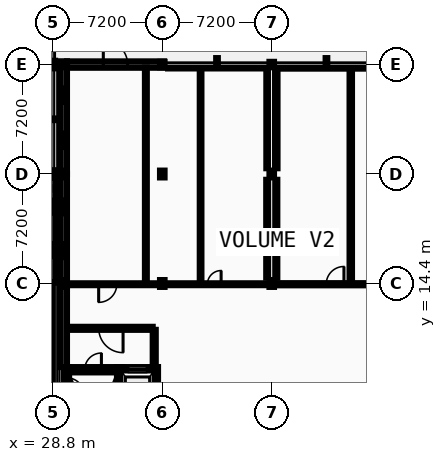
"""IFC4 building model, lengths in metres.
Left out: names, types, materials, properties, quantities, classifications, styles, units other than length and angle.
Written with IfcOpenShell. Run it as: python <this file> out.ifc"""

import sys

from ifc_helpers import new_model, si_unit, direction, frame, frame_2d, origin, origin_2d, place, context, subcontext, project, spatial, rectangle, i_section, extrude, element, fill, save


model = new_model("IFC4")
c1 = context("Model", 3, precision=1e-05, world=origin(), true_north=direction((0.0, 1.0)))
c2 = subcontext(c1, "Body", "Model", "MODEL_VIEW")
j1 = project(units=[si_unit("LENGTHUNIT", "METRE"), si_unit("PLANEANGLEUNIT", "RADIAN")], contexts=[c1])
p1 = place(None, origin())
s1 = spatial("IfcSite", under=j1, at=p1, CompositionType="ELEMENT")
p2 = place(p1, origin())
s2 = spatial("IfcBuilding", under=s1, at=p2, CompositionType="ELEMENT")
p3 = place(p2, origin())
s3 = spatial("IfcBuildingStorey", under=s2, at=p3, CompositionType="ELEMENT", Elevation=0.0)
for number, where, z_axis, x_axis in (
    (1, (28.8, 21.6, 0.0), (0.0, 0.0, 1.0), (1.0, 0.0, 0.0)),
    (2, (28.8, 28.8, 0.0), (0.0, 0.0, 1.0), (1.0, 0.0, 0.0)),
):
    element("IfcColumn", number, at=place(p3, frame(where, z_axis=z_axis, x_axis=x_axis)), inside=s3, PredefinedType="COLUMN", context=c2, shape_type="SweptSolid", body=[
        extrude(i_section(OverallWidth=0.3, OverallDepth=0.5, WebThickness=0.014, FlangeThickness=0.028, FilletRadius=0.027, at=origin_2d()), origin(), (0.0, 0.0, 1.0), 5.2),
    ])
for number, where, z_axis, x_axis in (
    (3, (29.52, 14.4, 0.0), (0.0, 0.0, 1.0), (1.0, 0.0, 0.0)),
    (4, (29.52, 21.6, 0.0), (0.0, 0.0, 1.0), (1.0, 0.0, 0.0)),
):
    element("IfcColumn", number, at=place(p3, frame(where, z_axis=z_axis, x_axis=x_axis)), inside=s3, PredefinedType="COLUMN", context=c2, shape_type="SweptSolid", body=[
        extrude(i_section(OverallWidth=0.3, OverallDepth=0.45, WebThickness=0.014, FlangeThickness=0.026, FilletRadius=0.027, at=origin_2d()), origin(), (0.0, 0.0, 1.0), 5.2),
    ])
p4 = place(p3, frame((29.52, 28.8, 0.0), z_axis=(0.0, 0.0, 1.0), x_axis=(1.0, 0.0, 0.0)))
e5 = element("IfcColumn", 5, at=p4, inside=s3, PredefinedType="COLUMN", context=c2, shape_type="SweptSolid", body=[
    extrude(i_section(OverallWidth=0.3, OverallDepth=0.36, WebThickness=0.012, FlangeThickness=0.022, FilletRadius=0.027, at=origin_2d()), origin(), (0.0, 0.0, 1.0), 5.2),
])
for number, where, z_axis, x_axis in (
    (6, (36.0, 14.4, 0.0), (0.0, 0.0, 1.0), (1.0, 0.0, 0.0)),
    (7, (36.0, 21.6, 0.0), (0.0, 0.0, 1.0), (1.0, 0.0, 0.0)),
):
    element("IfcColumn", number, at=place(p3, frame(where, z_axis=z_axis, x_axis=x_axis)), inside=s3, PredefinedType="COLUMN", context=c2, shape_type="SweptSolid", body=[
        extrude(i_section(OverallWidth=0.3, OverallDepth=0.45, WebThickness=0.014, FlangeThickness=0.026, FilletRadius=0.027, at=origin_2d()), origin(), (0.0, 0.0, 1.0), 5.2),
    ])
p5 = place(p3, frame((36.0, 28.8, 0.0), z_axis=(0.0, 0.0, 1.0), x_axis=(1.0, 0.0, 0.0)))
e8 = element("IfcColumn", 8, at=p5, inside=s3, PredefinedType="COLUMN", context=c2, shape_type="SweptSolid", body=[
    extrude(i_section(OverallWidth=0.3, OverallDepth=0.36, WebThickness=0.012, FlangeThickness=0.022, FilletRadius=0.027, at=origin_2d()), origin(), (0.0, 0.0, 1.0), 5.2),
])
for number, where, z_axis, x_axis in (
    (9, (43.2, 14.4, 0.0), (0.0, 0.0, 1.0), (1.0, 0.0, 0.0)),
    (10, (43.2, 21.6, 0.0), (0.0, 0.0, 1.0), (1.0, 0.0, 0.0)),
):
    element("IfcColumn", number, at=place(p3, frame(where, z_axis=z_axis, x_axis=x_axis)), inside=s3, PredefinedType="COLUMN", context=c2, shape_type="SweptSolid", body=[
        extrude(i_section(OverallWidth=0.3, OverallDepth=0.45, WebThickness=0.014, FlangeThickness=0.026, FilletRadius=0.027, at=origin_2d()), origin(), (0.0, 0.0, 1.0), 5.2),
    ])
p6 = place(p3, frame((43.2, 28.8, 0.0), z_axis=(0.0, 0.0, 1.0), x_axis=(1.0, 0.0, 0.0)))
e11 = element("IfcColumn", 11, at=p6, inside=s3, PredefinedType="COLUMN", context=c2, shape_type="SweptSolid", body=[
    extrude(i_section(OverallWidth=0.3, OverallDepth=0.36, WebThickness=0.012, FlangeThickness=0.022, FilletRadius=0.027, at=origin_2d()), origin(), (0.0, 0.0, 1.0), 5.2),
])
p7 = place(p3, frame((28.8, 14.45, 0.0), z_axis=(0.0, 0.0, 1.0), x_axis=(0.0, 1.0, 0.0)))
e12 = element("IfcWall", 12, at=p7, inside=s3, PredefinedType="STANDARD", context=c2, shape_type="SweptSolid", body=[
    extrude(rectangle(XDim=7.15, YDim=0.42, at=frame_2d((3.575, 0.0))), origin(), (0.0, 0.0, 1.0), 4.97),
])
p8 = place(p7, frame((1.647, 0.0, 0.95)))
e13 = element("IfcOpeningElement", 13, at=p8, cuts=e12, PredefinedType="OPENING", context=c2, shape_type="SweptSolid", body=[
    extrude(rectangle(XDim=0.996, YDim=1.26, at=frame_2d((0.498, 0.63))), frame((0.0, 0.22, 0.0), z_axis=(0.0, -1.0, 0.0), x_axis=(1.0, 0.0, 0.0)), (0.0, 0.0, 1.0), 0.44),
])
p9 = place(p7, frame((4.507, 0.0, 0.95)))
e14 = element("IfcOpeningElement", 14, at=p9, cuts=e12, PredefinedType="OPENING", context=c2, shape_type="SweptSolid", body=[
    extrude(rectangle(XDim=0.996, YDim=1.26, at=frame_2d((0.498, 0.63))), frame((0.0, 0.22, 0.0), z_axis=(0.0, -1.0, 0.0), x_axis=(1.0, 0.0, 0.0)), (0.0, 0.0, 1.0), 0.44),
])
p10 = place(p3, frame((36.11, 28.8, 0.0), z_axis=(0.0, 0.0, 1.0), x_axis=(-1.0, 0.0, 0.0)))
e15 = element("IfcWall", 15, at=p10, inside=s3, PredefinedType="STANDARD", context=c2, shape_type="SweptSolid", body=[
    extrude(rectangle(XDim=6.38, YDim=0.42, at=frame_2d((3.19, 0.0))), origin(), (0.0, 0.0, 1.0), 4.665),
])
p11 = place(p10, frame((2.39, 0.0, 0.0)))
e16 = element("IfcOpeningElement", 16, at=p11, cuts=e15, PredefinedType="OPENING", context=c2, shape_type="SweptSolid", body=[
    extrude(rectangle(XDim=1.6, YDim=2.2, at=frame_2d((0.8, 1.1))), frame((0.0, 0.22, 0.0), z_axis=(0.0, -1.0, 0.0), x_axis=(1.0, 0.0, 0.0)), (0.0, 0.0, 1.0), 0.44),
])
p12 = place(p3, frame((29.52, 14.4, 0.0), z_axis=(0.0, 0.0, 1.0), x_axis=(0.0, -1.0, 0.0)))
e17 = element("IfcWall", 17, at=p12, inside=s3, PredefinedType="STANDARD", context=c2, shape_type="SweptSolid", body=[
    extrude(rectangle(XDim=5.5, YDim=0.42, at=frame_2d((2.75, 0.0))), origin(), (0.0, 0.0, 1.0), 4.97),
])
p13 = place(p3, frame((29.52, 21.6, 0.0), z_axis=(0.0, 0.0, 1.0), x_axis=(0.0, -1.0, 0.0)))
e18 = element("IfcWall", 18, at=p13, inside=s3, PredefinedType="STANDARD", context=c2, shape_type="SweptSolid", body=[
    extrude(rectangle(XDim=7.2, YDim=0.42, at=frame_2d((3.6, 0.0))), origin(), (0.0, 0.0, 1.0), 4.665),
])
p14 = place(p13, frame((1.628, 0.0, 0.95)))
e19 = element("IfcOpeningElement", 19, at=p14, cuts=e18, PredefinedType="OPENING", context=c2, shape_type="SweptSolid", body=[
    extrude(rectangle(XDim=1.064, YDim=1.296, at=frame_2d((0.532, 0.648))), frame((0.0, 0.22, 0.0), z_axis=(0.0, -1.0, 0.0), x_axis=(1.0, 0.0, 0.0)), (0.0, 0.0, 1.0), 0.44),
])
p15 = place(p13, frame((4.508, 0.0, 0.95)))
e20 = element("IfcOpeningElement", 20, at=p15, cuts=e18, PredefinedType="OPENING", context=c2, shape_type="SweptSolid", body=[
    extrude(rectangle(XDim=1.064, YDim=1.296, at=frame_2d((0.532, 0.648))), frame((0.0, 0.22, 0.0), z_axis=(0.0, -1.0, 0.0), x_axis=(1.0, 0.0, 0.0)), (0.0, 0.0, 1.0), 0.44),
])
p16 = place(p3, frame((29.52, 29.01, 0.0), z_axis=(0.0, 0.0, 1.0), x_axis=(0.0, -1.0, 0.0)))
e21 = element("IfcWall", 21, at=p16, inside=s3, PredefinedType="STANDARD", context=c2, shape_type="SweptSolid", body=[
    extrude(rectangle(XDim=7.41, YDim=0.42, at=frame_2d((3.705, 0.0))), origin(), (0.0, 0.0, 1.0), 4.665),
])
p17 = place(p16, frame((1.674, 0.0, 0.95)))
e22 = element("IfcOpeningElement", 22, at=p17, cuts=e21, PredefinedType="OPENING", context=c2, shape_type="SweptSolid", body=[
    extrude(rectangle(XDim=1.098, YDim=1.296, at=frame_2d((0.549, 0.648))), frame((0.0, 0.22, 0.0), z_axis=(0.0, -1.0, 0.0), x_axis=(1.0, 0.0, 0.0)), (0.0, 0.0, 1.0), 0.44),
])
p18 = place(p16, frame((4.638, 0.0, 0.95)))
e23 = element("IfcOpeningElement", 23, at=p18, cuts=e21, PredefinedType="OPENING", context=c2, shape_type="SweptSolid", body=[
    extrude(rectangle(XDim=1.098, YDim=1.296, at=frame_2d((0.549, 0.648))), frame((0.0, 0.22, 0.0), z_axis=(0.0, -1.0, 0.0), x_axis=(1.0, 0.0, 0.0)), (0.0, 0.0, 1.0), 0.44),
])
p19 = place(p3, frame((28.6, 5.85, 0.0), z_axis=(0.0, 0.0, 1.0), x_axis=(0.0, 1.0, 0.0)))
e24 = element("IfcWall", 24, at=p19, inside=s3, PredefinedType="SHEAR", context=c2, shape_type="SweptSolid", body=[
    extrude(rectangle(XDim=8.6, YDim=0.4, at=frame_2d((4.3, 0.0))), origin(), (0.0, 0.0, 1.0), 4.97),
])
p20 = place(p19, frame((6.65, 0.0, 0.0)))
e25 = element("IfcOpeningElement", 25, at=p20, cuts=e24, PredefinedType="OPENING", context=c2, shape_type="SweptSolid", body=[
    extrude(rectangle(XDim=1.2, YDim=2.15, at=frame_2d((0.6, 1.075))), frame((0.0, 0.21, 0.0), z_axis=(0.0, -1.0, 0.0), x_axis=(1.0, 0.0, 0.0)), (0.0, 0.0, 1.0), 0.42),
])
p21 = place(p3, frame((29.87, 8.725, 0.0), z_axis=(0.0, 0.0, 1.0), x_axis=(1.0, 0.0, 0.0)))
e26 = element("IfcWall", 26, at=p21, inside=s3, PredefinedType="SHEAR", context=c2, shape_type="SweptSolid", body=[
    extrude(rectangle(XDim=3.15, YDim=0.35, at=frame_2d((1.575, 0.0))), origin(), (0.0, 0.0, 1.0), 4.97),
])
p22 = place(p21, frame((1.025, 0.0, 0.0)))
e27 = element("IfcOpeningElement", 27, at=p22, cuts=e26, PredefinedType="OPENING", context=c2, shape_type="SweptSolid", body=[
    extrude(rectangle(XDim=1.1, YDim=2.15, at=frame_2d((0.55, 1.075))), frame((0.0, 0.185, 0.0), z_axis=(0.0, -1.0, 0.0), x_axis=(1.0, 0.0, 0.0)), (0.0, 0.0, 1.0), 0.37),
])
p23 = place(p3, frame((29.695, 0.4, 0.0), z_axis=(0.0, 0.0, 1.0), x_axis=(0.0, 1.0, 0.0)))
e28 = element("IfcWall", 28, at=p23, inside=s3, PredefinedType="SHEAR", context=c2, shape_type="SweptSolid", body=[
    extrude(rectangle(XDim=8.5, YDim=0.35, at=frame_2d((4.25, 0.0))), origin(), (0.0, 0.0, 1.0), 4.97),
])
p24 = place(p23, frame((6.6, 0.0, 0.0)))
e29 = element("IfcOpeningElement", 29, at=p24, cuts=e28, PredefinedType="OPENING", context=c2, shape_type="SweptSolid", body=[
    extrude(rectangle(XDim=1.2, YDim=2.15, at=frame_2d((0.6, 1.075))), frame((0.0, 0.185, 0.0), z_axis=(0.0, -1.0, 0.0), x_axis=(1.0, 0.0, 0.0)), (0.0, 0.0, 1.0), 0.37),
])
p25 = place(p3, frame((33.195, 0.4, 0.0), z_axis=(0.0, 0.0, 1.0), x_axis=(0.0, 1.0, 0.0)))
e30 = element("IfcWall", 30, at=p25, inside=s3, PredefinedType="SHEAR", context=c2, shape_type="SweptSolid", body=[
    extrude(rectangle(XDim=8.5, YDim=0.35, at=frame_2d((4.25, 0.0))), origin(), (0.0, 0.0, 1.0), 4.97),
])
p26 = place(p3, frame((33.37, 8.725, 0.0), z_axis=(0.0, 0.0, 1.0), x_axis=(1.0, 0.0, 0.0)))
e31 = element("IfcWall", 31, at=p26, inside=s3, PredefinedType="SHEAR", context=c2, shape_type="SweptSolid", body=[
    extrude(rectangle(XDim=2.0, YDim=0.35, at=frame_2d((1.0, 0.0))), origin(), (0.0, 0.0, 1.0), 4.97),
])
p27 = place(p26, frame((0.4, 0.0, 0.0)))
e32 = element("IfcOpeningElement", 32, at=p27, cuts=e31, PredefinedType="OPENING", context=c2, shape_type="SweptSolid", body=[
    extrude(rectangle(XDim=1.2, YDim=2.2, at=frame_2d((0.6, 1.1))), frame((0.0, 0.185, 0.0), z_axis=(0.0, -1.0, 0.0), x_axis=(1.0, 0.0, 0.0)), (0.0, 0.0, 1.0), 0.37),
])
p28 = place(p3, frame((35.545, 5.2, 0.0), z_axis=(0.0, 0.0, 1.0), x_axis=(0.0, 1.0, 0.0)))
e33 = element("IfcWall", 33, at=p28, inside=s3, PredefinedType="SHEAR", context=c2, shape_type="SweptSolid", body=[
    extrude(rectangle(XDim=3.7, YDim=0.35, at=frame_2d((1.85, 0.0))), origin(), (0.0, 0.0, 1.0), 4.97),
])
p29 = place(p3, frame((29.87, 11.45, 0.0), z_axis=(0.0, 0.0, 1.0), x_axis=(1.0, 0.0, 0.0)))
e34 = element("IfcWall", 34, at=p29, inside=s3, PredefinedType="PARTITIONING", context=c2, shape_type="SweptSolid", body=[
    extrude(rectangle(XDim=5.5, YDim=0.2, at=frame_2d((2.75, 0.0))), origin(), (0.0, 0.0, 1.0), 4.97),
])
p30 = place(p29, frame((1.95, 0.0, 0.0)))
e35 = element("IfcOpeningElement", 35, at=p30, cuts=e34, PredefinedType="OPENING", context=c2, shape_type="SweptSolid", body=[
    extrude(rectangle(XDim=1.6, YDim=2.2, at=frame_2d((0.8, 1.1))), frame((0.0, 0.11, 0.0), z_axis=(0.0, -1.0, 0.0), x_axis=(1.0, 0.0, 0.0)), (0.0, 0.0, 1.0), 0.22),
])
p31 = place(p3, frame((35.47, 8.9, 0.0), z_axis=(0.0, 0.0, 1.0), x_axis=(0.0, 1.0, 0.0)))
e36 = element("IfcWall", 36, at=p31, inside=s3, PredefinedType="PARTITIONING", context=c2, shape_type="SweptSolid", body=[
    extrude(rectangle(XDim=2.45, YDim=0.2, at=frame_2d((1.225, 0.0))), origin(), (0.0, 0.0, 1.0), 4.97),
])
p32 = place(p3, frame((29.9, 14.35, 0.0), z_axis=(0.0, 0.0, 1.0), x_axis=(1.0, 0.0, 0.0)))
e37 = element("IfcWall", 37, at=p32, inside=s3, PredefinedType="PARTITIONING", context=c2, shape_type="SweptSolid", body=[
    extrude(rectangle(XDim=5.72, YDim=0.125, at=frame_2d((2.86, 0.0))), origin(), (0.0, 0.0, 1.0), 4.665),
])
p33 = place(p32, frame((1.914, 0.0, 0.0)))
e38 = element("IfcOpeningElement", 38, at=p33, cuts=e37, PredefinedType="OPENING", context=c2, shape_type="SweptSolid", body=[
    extrude(rectangle(XDim=1.192, YDim=2.068, at=frame_2d((0.596, 1.034))), frame((0.0, 0.073, 0.0), z_axis=(0.0, -1.0, 0.0), x_axis=(1.0, 0.0, 0.0)), (0.0, 0.0, 1.0), 0.145),
])
p34 = place(p3, frame((36.38, 14.35, 0.0), z_axis=(0.0, 0.0, 1.0), x_axis=(1.0, 0.0, 0.0)))
e39 = element("IfcWall", 39, at=p34, inside=s3, PredefinedType="PARTITIONING", context=c2, shape_type="SweptSolid", body=[
    extrude(rectangle(XDim=6.44, YDim=0.125, at=frame_2d((3.22, 0.0))), origin(), (0.0, 0.0, 1.0), 4.665),
])
p35 = place(p34, frame((0.57, 0.0, 0.0)))
e40 = element("IfcOpeningElement", 40, at=p35, cuts=e39, PredefinedType="OPENING", context=c2, shape_type="SweptSolid", body=[
    extrude(rectangle(XDim=1.0, YDim=2.1, at=frame_2d((0.5, 1.05))), frame((0.0, 0.073, 0.0), z_axis=(0.0, -1.0, 0.0), x_axis=(1.0, 0.0, 0.0)), (0.0, 0.0, 1.0), 0.145),
])
p36 = place(p34, frame((2.59, 0.0, 0.0)))
e41 = element("IfcOpeningElement", 41, at=p36, cuts=e39, PredefinedType="OPENING", context=c2, shape_type="SweptSolid", body=[
    extrude(rectangle(XDim=0.9, YDim=2.1, at=frame_2d((0.45, 1.05))), frame((0.0, 0.073, 0.0), z_axis=(0.0, -1.0, 0.0), x_axis=(1.0, 0.0, 0.0)), (0.0, 0.0, 1.0), 0.145),
])
p37 = place(p3, frame((43.58, 14.35, 0.0), z_axis=(0.0, 0.0, 1.0), x_axis=(1.0, 0.0, 0.0)))
e42 = element("IfcWall", 42, at=p37, inside=s3, PredefinedType="PARTITIONING", context=c2, shape_type="SweptSolid", body=[
    extrude(rectangle(XDim=6.44, YDim=0.142, at=frame_2d((3.22, 0.0))), origin(), (0.0, 0.0, 1.0), 4.665),
])
p38 = place(p37, frame((3.204, 0.0, 0.0)))
e43 = element("IfcOpeningElement", 43, at=p38, cuts=e42, PredefinedType="OPENING", context=c2, shape_type="SweptSolid", body=[
    extrude(rectangle(XDim=1.166, YDim=2.068, at=frame_2d((0.583, 1.034))), frame((0.0, 0.081, 0.0), z_axis=(0.0, -1.0, 0.0), x_axis=(1.0, 0.0, 0.0)), (0.0, 0.0, 1.0), 0.162),
])
p39 = place(p3, frame((36.38, 28.6, 0.0), z_axis=(0.0, 0.0, 1.0), x_axis=(1.0, 0.0, 0.0)))
e44 = element("IfcWall", 44, at=p39, inside=s3, PredefinedType="PARTITIONING", context=c2, shape_type="SweptSolid", body=[
    extrude(rectangle(XDim=6.44, YDim=0.11, at=frame_2d((3.22, 0.0))), origin(), (0.0, 0.0, 1.0), 4.665),
])
p40 = place(p3, frame((43.58, 28.6, 0.0), z_axis=(0.0, 0.0, 1.0), x_axis=(1.0, 0.0, 0.0)))
e45 = element("IfcWall", 45, at=p40, inside=s3, PredefinedType="PARTITIONING", context=c2, shape_type="SweptSolid", body=[
    extrude(rectangle(XDim=6.44, YDim=0.135, at=frame_2d((3.22, 0.0))), origin(), (0.0, 0.0, 1.0), 4.665),
])
p41 = place(p3, frame((34.92, 14.413, 0.0), z_axis=(0.0, 0.0, 1.0), x_axis=(0.0, 1.0, 0.0)))
e46 = element("IfcWall", 46, at=p41, inside=s3, PredefinedType="PARTITIONING", context=c2, shape_type="SweptSolid", body=[
    extrude(rectangle(XDim=14.188, YDim=0.125, at=frame_2d((7.094, 0.0))), origin(), (0.0, 0.0, 1.0), 4.97),
])
p42 = place(p3, frame((38.52, 14.413, 0.0), z_axis=(0.0, 0.0, 1.0), x_axis=(0.0, 1.0, 0.0)))
e47 = element("IfcWall", 47, at=p42, inside=s3, PredefinedType="PARTITIONING", context=c2, shape_type="SweptSolid", body=[
    extrude(rectangle(XDim=14.132, YDim=0.11, at=frame_2d((7.066, 0.0))), origin(), (0.0, 0.0, 1.0), 4.655),
])
p43 = place(p3, frame((42.9, 14.78, 0.0), z_axis=(0.0, 0.0, 1.0), x_axis=(0.0, 1.0, 0.0)))
e48 = element("IfcWall", 48, at=p43, inside=s3, PredefinedType="PARTITIONING", context=c2, shape_type="SweptSolid", body=[
    extrude(rectangle(XDim=6.44, YDim=0.125, at=frame_2d((3.22, 0.0))), origin(), (0.0, 0.0, 1.0), 4.97),
])
p44 = place(p3, frame((42.9, 21.98, 0.0), z_axis=(0.0, 0.0, 1.0), x_axis=(0.0, 1.0, 0.0)))
e49 = element("IfcWall", 49, at=p44, inside=s3, PredefinedType="PARTITIONING", context=c2, shape_type="SweptSolid", body=[
    extrude(rectangle(XDim=6.44, YDim=0.11, at=frame_2d((3.22, 0.0))), origin(), (0.0, 0.0, 1.0), 4.97),
])
p45 = place(p3, frame((43.5, 14.78, 0.0), z_axis=(0.0, 0.0, 1.0), x_axis=(0.0, 1.0, 0.0)))
e50 = element("IfcWall", 50, at=p45, inside=s3, PredefinedType="PARTITIONING", context=c2, shape_type="SweptSolid", body=[
    extrude(rectangle(XDim=6.44, YDim=0.135, at=frame_2d((3.22, 0.0))), origin(), (0.0, 0.0, 1.0), 4.97),
])
p46 = place(p3, frame((43.5, 21.98, 0.0), z_axis=(0.0, 0.0, 1.0), x_axis=(0.0, 1.0, 0.0)))
e51 = element("IfcWall", 51, at=p46, inside=s3, PredefinedType="PARTITIONING", context=c2, shape_type="SweptSolid", body=[
    extrude(rectangle(XDim=6.44, YDim=0.16, at=frame_2d((3.22, 0.0))), origin(), (0.0, 0.0, 1.0), 4.665),
])
p47 = place(p3, frame((48.4, 14.421, 0.0), z_axis=(0.0, 0.0, 1.0), x_axis=(0.0, 1.0, 0.0)))
e52 = element("IfcWall", 52, at=p47, inside=s3, PredefinedType="PARTITIONING", context=c2, shape_type="SweptSolid", body=[
    extrude(rectangle(XDim=14.112, YDim=0.16, at=frame_2d((7.056, 0.0))), origin(), (0.0, 0.0, 1.0), 4.97),
])
p48 = place(p8, origin())
e53 = element("IfcWindow", 53, at=p48, inside=s3, PartitioningType="SINGLE_PANEL", PredefinedType="WINDOW", context=c2, shape_type="SweptSolid", body=[
    extrude(rectangle(XDim=0.996, YDim=1.26, at=frame_2d((0.498, 0.63))), frame((0.0, 0.03, 0.0), z_axis=(0.0, -1.0, 0.0), x_axis=(1.0, 0.0, 0.0)), (0.0, 0.0, 1.0), 0.06),
])
fill(e13, e53)
p49 = place(p9, origin())
e54 = element("IfcWindow", 54, at=p49, inside=s3, PartitioningType="SINGLE_PANEL", PredefinedType="WINDOW", context=c2, shape_type="SweptSolid", body=[
    extrude(rectangle(XDim=0.996, YDim=1.26, at=frame_2d((0.498, 0.63))), frame((0.0, 0.03, 0.0), z_axis=(0.0, -1.0, 0.0), x_axis=(1.0, 0.0, 0.0)), (0.0, 0.0, 1.0), 0.06),
])
fill(e14, e54)
p50 = place(p14, origin())
e55 = element("IfcWindow", 55, at=p50, inside=s3, PartitioningType="SINGLE_PANEL", PredefinedType="WINDOW", context=c2, shape_type="SweptSolid", body=[
    extrude(rectangle(XDim=1.064, YDim=1.296, at=frame_2d((0.532, 0.648))), frame((0.0, 0.03, 0.0), z_axis=(0.0, -1.0, 0.0), x_axis=(1.0, 0.0, 0.0)), (0.0, 0.0, 1.0), 0.06),
])
fill(e19, e55)
p51 = place(p15, origin())
e56 = element("IfcWindow", 56, at=p51, inside=s3, PartitioningType="SINGLE_PANEL", PredefinedType="WINDOW", context=c2, shape_type="SweptSolid", body=[
    extrude(rectangle(XDim=1.064, YDim=1.296, at=frame_2d((0.532, 0.648))), frame((0.0, 0.03, 0.0), z_axis=(0.0, -1.0, 0.0), x_axis=(1.0, 0.0, 0.0)), (0.0, 0.0, 1.0), 0.06),
])
fill(e20, e56)
p52 = place(p17, origin())
e57 = element("IfcWindow", 57, at=p52, inside=s3, PartitioningType="SINGLE_PANEL", PredefinedType="WINDOW", context=c2, shape_type="SweptSolid", body=[
    extrude(rectangle(XDim=1.098, YDim=1.296, at=frame_2d((0.549, 0.648))), frame((0.0, 0.03, 0.0), z_axis=(0.0, -1.0, 0.0), x_axis=(1.0, 0.0, 0.0)), (0.0, 0.0, 1.0), 0.06),
])
fill(e22, e57)
p53 = place(p18, origin())
e58 = element("IfcWindow", 58, at=p53, inside=s3, PartitioningType="SINGLE_PANEL", PredefinedType="WINDOW", context=c2, shape_type="SweptSolid", body=[
    extrude(rectangle(XDim=1.098, YDim=1.296, at=frame_2d((0.549, 0.648))), frame((0.0, 0.03, 0.0), z_axis=(0.0, -1.0, 0.0), x_axis=(1.0, 0.0, 0.0)), (0.0, 0.0, 1.0), 0.06),
])
fill(e23, e58)
p54 = place(p11, origin())
e59 = element("IfcDoor", 59, at=p54, inside=s3, OperationType="DOUBLE_DOOR_SINGLE_SWING", PredefinedType="DOOR", context=c2, shape_type="SweptSolid", body=[
    extrude(rectangle(XDim=1.6, YDim=2.2, at=frame_2d((0.8, 1.1))), frame((0.0, 0.025, 0.0), z_axis=(0.0, -1.0, 0.0), x_axis=(1.0, 0.0, 0.0)), (0.0, 0.0, 1.0), 0.05),
])
fill(e16, e59)
p55 = place(p22, frame((1.1, 0.0, 0.0), z_axis=(0.0, 0.0, 1.0), x_axis=(-1.0, 0.0, 0.0)))
e60 = element("IfcDoor", 60, at=p55, inside=s3, OperationType="SINGLE_SWING_RIGHT", PredefinedType="DOOR", context=c2, shape_type="SweptSolid", body=[
    extrude(rectangle(XDim=1.1, YDim=2.15, at=frame_2d((0.55, 1.075))), frame((0.0, 0.025, 0.0), z_axis=(0.0, -1.0, 0.0), x_axis=(1.0, 0.0, 0.0)), (0.0, 0.0, 1.0), 0.05),
])
fill(e27, e60)
p56 = place(p24, frame((1.2, 0.0, 0.0), z_axis=(0.0, 0.0, 1.0), x_axis=(-1.0, 0.0, 0.0)))
e61 = element("IfcDoor", 61, at=p56, inside=s3, OperationType="SINGLE_SWING_LEFT", PredefinedType="DOOR", context=c2, shape_type="SweptSolid", body=[
    extrude(rectangle(XDim=1.2, YDim=2.15, at=frame_2d((0.6, 1.075))), frame((0.0, 0.025, 0.0), z_axis=(0.0, -1.0, 0.0), x_axis=(1.0, 0.0, 0.0)), (0.0, 0.0, 1.0), 0.05),
])
fill(e29, e61)
p57 = place(p27, origin())
e62 = element("IfcDoor", 62, at=p57, inside=s3, OperationType="SLIDING_TO_RIGHT", PredefinedType="DOOR", context=c2, shape_type="SweptSolid", body=[
    extrude(rectangle(XDim=1.2, YDim=2.2, at=frame_2d((0.6, 1.1))), frame((0.0, 0.025, 0.0), z_axis=(0.0, -1.0, 0.0), x_axis=(1.0, 0.0, 0.0)), (0.0, 0.0, 1.0), 0.05),
])
fill(e32, e62)
p58 = place(p30, origin())
e63 = element("IfcDoor", 63, at=p58, inside=s3, OperationType="DOUBLE_DOOR_SINGLE_SWING", PredefinedType="DOOR", context=c2, shape_type="SweptSolid", body=[
    extrude(rectangle(XDim=1.6, YDim=2.2, at=frame_2d((0.8, 1.1))), frame((0.0, 0.025, 0.0), z_axis=(0.0, -1.0, 0.0), x_axis=(1.0, 0.0, 0.0)), (0.0, 0.0, 1.0), 0.05),
])
fill(e35, e63)
p59 = place(p35, frame((1.0, 0.0, 0.0), z_axis=(0.0, 0.0, 1.0), x_axis=(-1.0, 0.0, 0.0)))
e64 = element("IfcDoor", 64, at=p59, inside=s3, OperationType="SLIDING_TO_LEFT", PredefinedType="DOOR", context=c2, shape_type="SweptSolid", body=[
    extrude(rectangle(XDim=1.0, YDim=2.1, at=frame_2d((0.5, 1.05))), frame((0.0, 0.025, 0.0), z_axis=(0.0, -1.0, 0.0), x_axis=(1.0, 0.0, 0.0)), (0.0, 0.0, 1.0), 0.05),
])
fill(e40, e64)
p60 = place(p36, frame((0.9, 0.0, 0.0), z_axis=(0.0, 0.0, 1.0), x_axis=(-1.0, 0.0, 0.0)))
e65 = element("IfcDoor", 65, at=p60, inside=s3, OperationType="SINGLE_SWING_RIGHT", PredefinedType="DOOR", context=c2, shape_type="SweptSolid", body=[
    extrude(rectangle(XDim=0.9, YDim=2.1, at=frame_2d((0.45, 1.05))), frame((0.0, 0.025, 0.0), z_axis=(0.0, -1.0, 0.0), x_axis=(1.0, 0.0, 0.0)), (0.0, 0.0, 1.0), 0.05),
])
fill(e41, e65)
p61 = place(p38, frame((1.166, 0.0, 0.0), z_axis=(0.0, 0.0, 1.0), x_axis=(-1.0, 0.0, 0.0)))
e66 = element("IfcDoor", 66, at=p61, inside=s3, OperationType="SINGLE_SWING_RIGHT", PredefinedType="DOOR", context=c2, shape_type="SweptSolid", body=[
    extrude(rectangle(XDim=1.166, YDim=2.068, at=frame_2d((0.583, 1.034))), frame((0.0, 0.025, 0.0), z_axis=(0.0, -1.0, 0.0), x_axis=(1.0, 0.0, 0.0)), (0.0, 0.0, 1.0), 0.05),
])
fill(e43, e66)
p62 = place(p33, frame((1.192, 0.0, 0.0), z_axis=(0.0, 0.0, 1.0), x_axis=(-1.0, 0.0, 0.0)))
e67 = element("IfcDoor", 67, at=p62, inside=s3, OperationType="SINGLE_SWING_LEFT", PredefinedType="DOOR", context=c2, shape_type="SweptSolid", body=[
    extrude(rectangle(XDim=1.192, YDim=2.068, at=frame_2d((0.596, 1.034))), frame((0.0, 0.025, 0.0), z_axis=(0.0, -1.0, 0.0), x_axis=(1.0, 0.0, 0.0)), (0.0, 0.0, 1.0), 0.05),
])
fill(e38, e67)
save(model, sys.argv[1])
